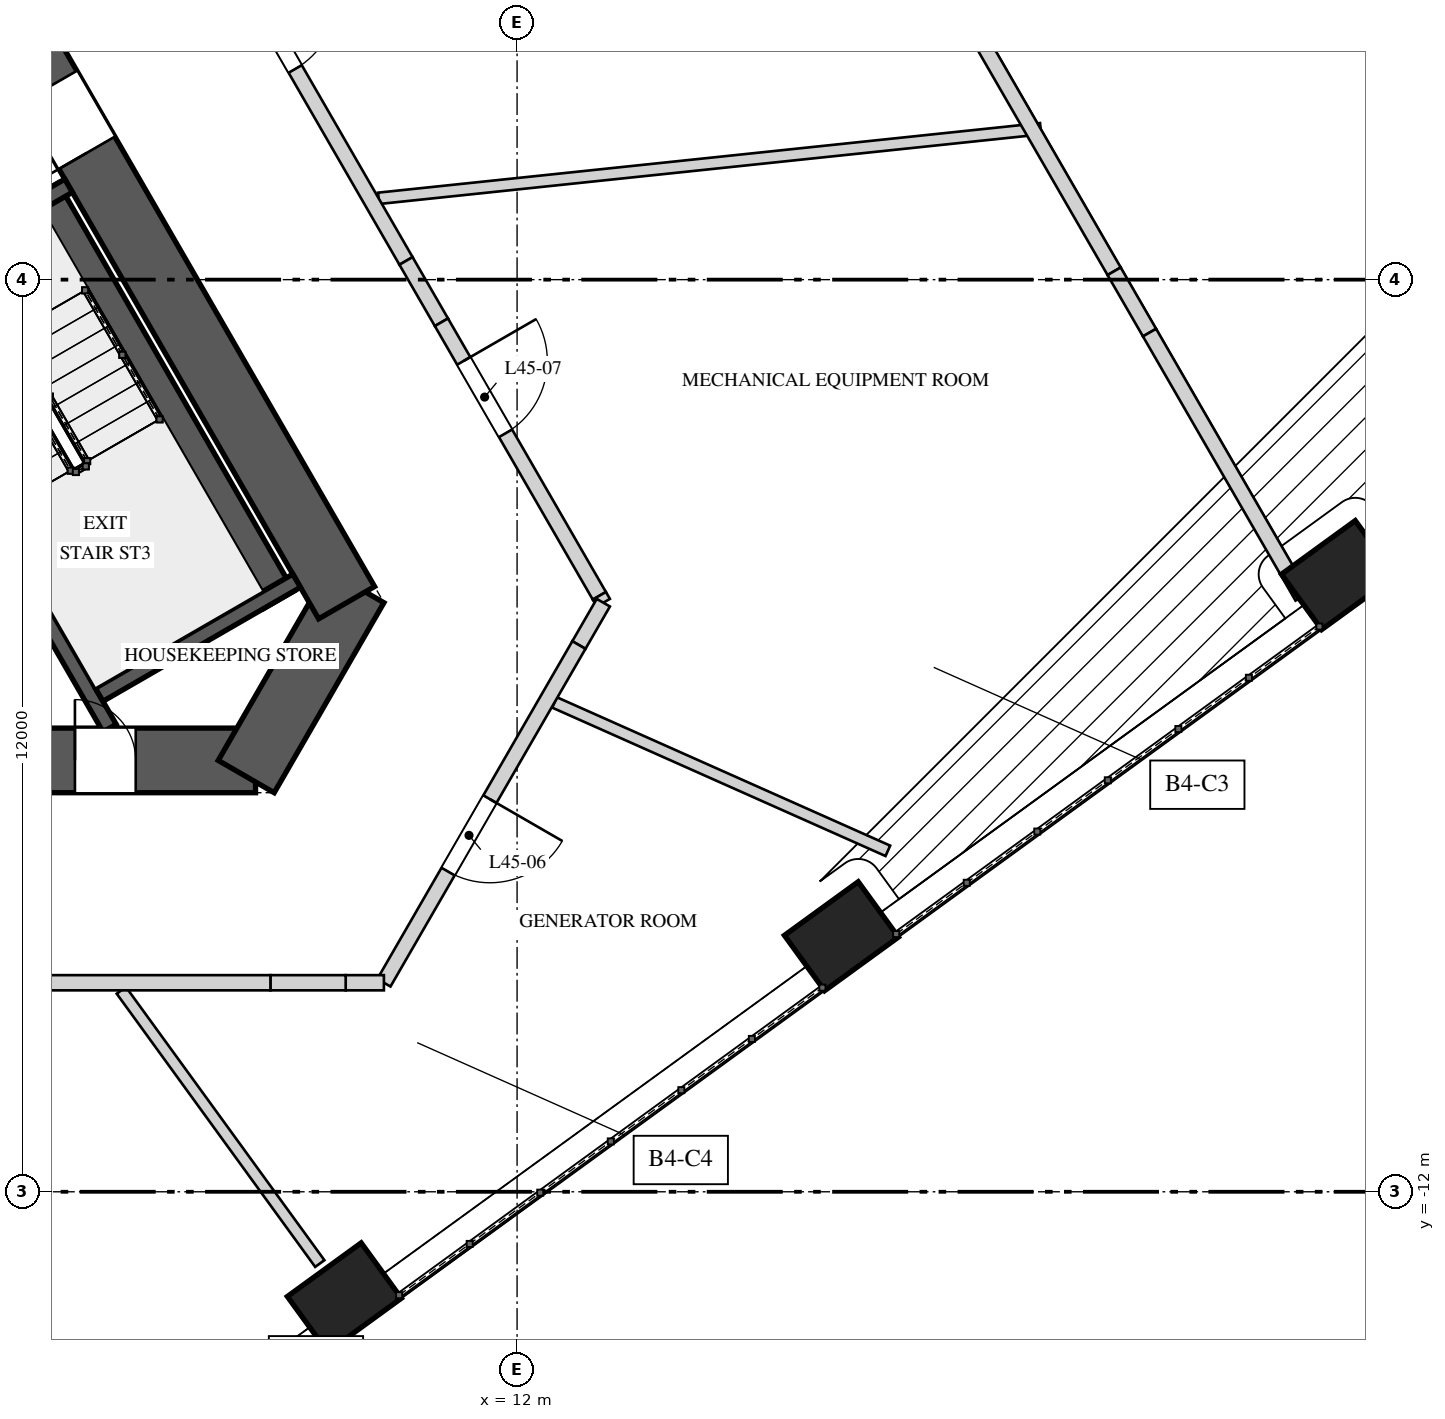
"""IFC4 building model, lengths in metres.
Left out: names, types, materials, properties, quantities, classifications, styles, units other than length and angle.
Written with IfcOpenShell. Run it as: python <this file> out.ifc"""

import sys

from ifc_helpers import new_model, si_unit, direction, frame, frame_2d, origin, origin_2d, place, context, subcontext, project, spatial, rectangle, extrude, element, fill, save


model = new_model("IFC4")
c1 = context("Model", 3, precision=1e-05, world=origin(), true_north=direction((0.0, 1.0)))
c2 = subcontext(c1, "Body", "Model", "MODEL_VIEW")
j1 = project(units=[si_unit("LENGTHUNIT", "METRE"), si_unit("PLANEANGLEUNIT", "RADIAN")], contexts=[c1])
p1 = place(None, origin())
s1 = spatial("IfcSite", under=j1, at=p1, CompositionType="ELEMENT")
p2 = place(p1, origin())
s2 = spatial("IfcBuilding", under=s1, at=p2, CompositionType="ELEMENT")
p3 = place(p2, frame((0.0, 0.0, 194.8)))
s3 = spatial("IfcBuildingStorey", under=s2, at=p3, CompositionType="ELEMENT", Elevation=194.8)
p4 = place(p3, frame((-8.559, -6.325, 0.0), z_axis=(0.0, 0.0, 1.0), x_axis=(1.0, 0.0, 0.0)))
e1 = element("IfcWall", 1, at=p4, inside=s3, PredefinedType="SHEAR", context=c2, shape_type="SweptSolid", body=[
    extrude(rectangle(XDim=17.118, YDim=0.85, at=frame_2d((8.559, 0.0))), origin(), (0.0, 0.0, 1.0), 5.2),
])
p5 = place(p4, frame((6.764, 0.0, 0.0)))
e2 = element("IfcOpeningElement", 2, at=p5, cuts=e1, PredefinedType="OPENING", context=c2, shape_type="SweptSolid", body=[
    extrude(rectangle(XDim=1.0, YDim=2.4, at=frame_2d((0.5, 1.2))), frame((0.0, 0.435, 0.0), z_axis=(0.0, -1.0, 0.0), x_axis=(1.0, 0.0, 0.0)), (0.0, 0.0, 1.0), 0.87),
])
p6 = place(p4, frame((14.742, 0.0, 0.0)))
e3 = element("IfcOpeningElement", 3, at=p6, cuts=e1, PredefinedType="OPENING", context=c2, shape_type="SweptSolid", body=[
    extrude(rectangle(XDim=0.8, YDim=2.1, at=frame_2d((0.4, 1.05))), frame((0.0, 0.435, 0.0), z_axis=(0.0, -1.0, 0.0), x_axis=(1.0, 0.0, 0.0)), (0.0, 0.0, 1.0), 0.87),
])
p7 = place(p3, frame((8.437, -6.538, 0.0), z_axis=(0.0, 0.0, 1.0), x_axis=(0.499995765644, 0.866027848477, 0.0)))
e4 = element("IfcWall", 4, at=p7, inside=s3, PredefinedType="SHEAR", context=c2, shape_type="SweptSolid", body=[
    extrude(rectangle(XDim=2.887, YDim=0.85, at=frame_2d((1.443, 0.0))), origin(), (0.0, 0.0, 1.0), 5.2),
])
p8 = place(p3, frame((9.757, -4.25, 0.0), z_axis=(0.0, 0.0, 1.0), x_axis=(-0.499995289315, 0.866028123483, 0.0)))
e5 = element("IfcWall", 5, at=p8, inside=s3, PredefinedType="SHEAR", context=c2, shape_type="SweptSolid", body=[
    extrude(rectangle(XDim=17.118, YDim=0.85, at=frame_2d((8.559, 0.0))), origin(), (0.0, 0.0, 1.0), 5.2),
])
p9 = place(p8, frame((6.834, 0.0, 0.0)))
e6 = element("IfcOpeningElement", 6, at=p9, cuts=e5, PredefinedType="OPENING", context=c2, shape_type="SweptSolid", body=[
    extrude(rectangle(XDim=1.0, YDim=2.4, at=frame_2d((0.5, 1.2))), frame((0.0, 0.435, 0.0), z_axis=(0.0, -1.0, 0.0), x_axis=(1.0, 0.0, 0.0)), (0.0, 0.0, 1.0), 0.87),
])
p10 = place(p8, frame((14.252, 0.0, 0.0)))
e7 = element("IfcOpeningElement", 7, at=p10, cuts=e5, PredefinedType="OPENING", context=c2, shape_type="SweptSolid", body=[
    extrude(rectangle(XDim=0.8, YDim=2.1, at=frame_2d((0.4, 1.05))), frame((0.0, 0.435, 0.0), z_axis=(0.0, -1.0, 0.0), x_axis=(1.0, 0.0, 0.0)), (0.0, 0.0, 1.0), 0.87),
])
for number, where, z_axis, x_axis in (
    (8, (9.728, -13.389, 0.0), (0.0, 0.0, 1.0), (0.809, 0.588, 0.0)),
    (9, (16.267, -8.638, 0.0), (0.0, 0.0, 1.0), (0.809, 0.588, 0.0)),
    (10, (22.806, -3.887, 0.0), (0.0, 0.0, 1.0), (0.809, 0.588, 0.0)),
):
    element("IfcColumn", number, at=place(p3, frame(where, z_axis=z_axis, x_axis=x_axis)), inside=s3, PredefinedType="COLUMN", context=c2, shape_type="SweptSolid", body=[
        extrude(rectangle(XDim=1.2, YDim=0.9, at=origin_2d()), origin(), (0.0, 0.0, 1.0), 2.835),
    ])
p11 = place(p3, frame((8.868, -4.21, 0.0), z_axis=(0.0, 0.0, 1.0), x_axis=(-0.500009909098, 0.866019682689, 0.0)))
e11 = element("IfcWall", 11, at=p11, inside=s3, PredefinedType="SOLIDWALL", context=c2, shape_type="SweptSolid", body=[
    extrude(rectangle(XDim=6.2, YDim=0.45, at=frame_2d((3.1, 0.0))), origin(), (0.0, 0.0, 1.0), 4.85),
])
p12 = place(p3, frame((6.64, -5.9, 0.0), z_axis=(0.0, 0.0, 1.0), x_axis=(-0.499999959354, 0.866025427251, 0.0)))
e12 = element("IfcWall", 12, at=p12, inside=s3, PredefinedType="SOLIDWALL", context=c2, shape_type="SweptSolid", body=[
    extrude(rectangle(XDim=6.549, YDim=0.2, at=frame_2d((3.275, 0.0))), origin(), (0.0, 0.0, 1.0), 4.85),
])
p13 = place(p3, frame((6.501, -5.461, 0.0), z_axis=(0.0, 0.0, 1.0), x_axis=(0.866031096941, 0.499990139034, 0.0)))
e13 = element("IfcWall", 13, at=p13, inside=s3, PredefinedType="SOLIDWALL", context=c2, shape_type="SweptSolid", body=[
    extrude(rectangle(XDim=3.0, YDim=0.2, at=frame_2d((1.5, 0.0))), origin(), (0.0, 0.0, 1.0), 4.85),
])
p14 = place(p3, frame((3.501, -0.265, 0.0), z_axis=(0.0, 0.0, 1.0), x_axis=(0.866031096941, 0.499990139034, 0.0)))
e14 = element("IfcWall", 14, at=p14, inside=s3, PredefinedType="SOLIDWALL", context=c2, shape_type="SweptSolid", body=[
    extrude(rectangle(XDim=3.0, YDim=0.2, at=frame_2d((1.5, 0.0))), origin(), (0.0, 0.0, 1.0), 4.85),
])
p15 = place(p14, frame((0.725, 0.0, 0.0)))
e15 = element("IfcOpeningElement", 15, at=p15, cuts=e14, PredefinedType="OPENING", context=c2, shape_type="SweptSolid", body=[
    extrude(rectangle(XDim=1.1, YDim=2.4, at=frame_2d((0.55, 1.2))), frame((0.0, 0.11, 0.0), z_axis=(0.0, -1.0, 0.0), x_axis=(1.0, 0.0, 0.0)), (0.0, 0.0, 1.0), 0.22),
])
p16 = place(p3, frame((6.793, -9.35, 0.0), z_axis=(0.0, 0.0, 1.0), x_axis=(0.587779529971, -0.809021151854, 0.0)))
e16 = element("IfcWall", 16, at=p16, inside=s3, PredefinedType="PARTITIONING", context=c2, shape_type="SweptSolid", body=[
    extrude(rectangle(XDim=4.443, YDim=0.15, at=frame_2d((2.221, 0.0))), origin(), (0.0, 0.0, 1.0), 4.85),
])
p17 = place(p3, frame((10.179, 1.07, 0.0), z_axis=(0.0, 0.0, 1.0), x_axis=(0.994523006427, 0.104517891713, 0.0)))
e17 = element("IfcWall", 17, at=p17, inside=s3, PredefinedType="PARTITIONING", context=c2, shape_type="SweptSolid", body=[
    extrude(rectangle(XDim=8.757, YDim=0.15, at=frame_2d((4.378, 0.0))), origin(), (0.0, 0.0, 1.0), 4.85),
])
p18 = place(p3, frame((12.493, -5.562, 0.0), z_axis=(0.0, 0.0, 1.0), x_axis=(0.913530294257, -0.40677069889, 0.0)))
e18 = element("IfcWall", 18, at=p18, inside=s3, PredefinedType="PARTITIONING", context=c2, shape_type="SweptSolid", body=[
    extrude(rectangle(XDim=4.8, YDim=0.15, at=frame_2d((2.4, 0.0))), origin(), (0.0, 0.0, 1.0), 4.85),
])
p19 = place(p3, frame((8.143, 4.396, 0.0), z_axis=(0.0, 0.0, 1.0), x_axis=(0.499997407846, -0.86602690036, 0.0)))
e19 = element("IfcWall", 19, at=p19, inside=s3, PredefinedType="SOLIDWALL", context=c2, shape_type="SweptSolid", body=[
    extrude(rectangle(XDim=4.791, YDim=0.2, at=frame_2d((2.396, 0.0))), origin(), (0.0, 0.0, 1.0), 4.85),
])
p20 = place(p19, frame((0.775, 0.0, 0.0)))
e20 = element("IfcOpeningElement", 20, at=p20, cuts=e19, PredefinedType="OPENING", context=c2, shape_type="SweptSolid", body=[
    extrude(rectangle(XDim=1.1, YDim=2.2, at=frame_2d((0.55, 1.1))), frame((0.0, 0.11, 0.0), z_axis=(0.0, -1.0, 0.0), x_axis=(1.0, 0.0, 0.0)), (0.0, 0.0, 1.0), 0.22),
])
p21 = place(p3, frame((10.539, 0.246, 0.0), z_axis=(0.0, 0.0, 1.0), x_axis=(0.499971966783, -0.866041588165, 0.0)))
e21 = element("IfcWall", 21, at=p21, inside=s3, PredefinedType="SOLIDWALL", context=c2, shape_type="SweptSolid", body=[
    extrude(rectangle(XDim=0.932, YDim=0.2, at=frame_2d((0.466, 0.0))), origin(), (0.0, 0.0, 1.0), 3.95),
])
p22 = place(p3, frame((11.005, -0.561, 0.0), z_axis=(0.0, 0.0, 1.0), x_axis=(0.499993700073, -0.866029041019, 0.0)))
e22 = element("IfcWall", 22, at=p22, inside=s3, PredefinedType="SOLIDWALL", context=c2, shape_type="SweptSolid", body=[
    extrude(rectangle(XDim=4.155, YDim=0.2, at=frame_2d((2.078, 0.0))), origin(), (0.0, 0.0, 1.0), 4.85),
])
p23 = place(p22, frame((0.587, 0.0, 0.0)))
e23 = element("IfcOpeningElement", 23, at=p23, cuts=e22, PredefinedType="OPENING", context=c2, shape_type="SweptSolid", body=[
    extrude(rectangle(XDim=1.1, YDim=2.2, at=frame_2d((0.55, 1.1))), frame((0.0, 0.11, 0.0), z_axis=(0.0, -1.0, 0.0), x_axis=(1.0, 0.0, 0.0)), (0.0, 0.0, 1.0), 0.22),
])
p24 = place(p3, frame((13.082, -4.159, 0.0), z_axis=(0.0, 0.0, 1.0), x_axis=(0.500393920955, -0.865797853931, 0.0)))
e24 = element("IfcWall", 24, at=p24, inside=s3, PredefinedType="SOLIDWALL", context=c2, shape_type="SweptSolid", body=[
    extrude(rectangle(XDim=0.105, YDim=0.2, at=frame_2d((0.052, 0.0))), origin(), (0.0, 0.0, 1.0), 4.15),
])
p25 = place(p3, frame((13.135, -4.25, 0.0), z_axis=(0.0, 0.0, 1.0), x_axis=(-0.500018234033, -0.866014876105, 0.0)))
e25 = element("IfcWall", 25, at=p25, inside=s3, PredefinedType="SOLIDWALL", context=c2, shape_type="SweptSolid", body=[
    extrude(rectangle(XDim=0.643, YDim=0.2, at=frame_2d((0.322, 0.0))), origin(), (0.0, 0.0, 1.0), 4.15),
])
p26 = place(p3, frame((12.813, -4.807, 0.0), z_axis=(0.0, 0.0, 1.0), x_axis=(-0.499992949462, -0.866029474376, 0.0)))
e26 = element("IfcWall", 26, at=p26, inside=s3, PredefinedType="SOLIDWALL", context=c2, shape_type="SweptSolid", body=[
    extrude(rectangle(XDim=5.13, YDim=0.2, at=frame_2d((2.565, 0.0))), origin(), (0.0, 0.0, 1.0), 4.85),
])
p27 = place(p26, frame((2.342, 0.0, 0.0)))
e27 = element("IfcOpeningElement", 27, at=p27, cuts=e26, PredefinedType="OPENING", context=c2, shape_type="SweptSolid", body=[
    extrude(rectangle(XDim=1.1, YDim=2.2, at=frame_2d((0.55, 1.1))), frame((0.0, 0.11, 0.0), z_axis=(0.0, -1.0, 0.0), x_axis=(1.0, 0.0, 0.0)), (0.0, 0.0, 1.0), 0.22),
])
p28 = place(p3, frame((10.248, -9.25, 0.0), z_axis=(0.0, 0.0, 1.0), x_axis=(-1.0, 0.0, 0.0)))
e28 = element("IfcWall", 28, at=p28, inside=s3, PredefinedType="SOLIDWALL", context=c2, shape_type="SweptSolid", body=[
    extrude(rectangle(XDim=0.503, YDim=0.2, at=frame_2d((0.251, 0.0))), origin(), (0.0, 0.0, 1.0), 4.85),
])
p29 = place(p3, frame((9.745, -9.25, 0.0), z_axis=(0.0, 0.0, 1.0), x_axis=(-1.0, 0.0, 0.0)))
e29 = element("IfcWall", 29, at=p29, inside=s3, PredefinedType="SOLIDWALL", context=c2, shape_type="SweptSolid", body=[
    extrude(rectangle(XDim=0.99, YDim=0.2, at=frame_2d((0.495, 0.0))), origin(), (0.0, 0.0, 1.0), 4.15),
])
p30 = place(p3, frame((8.755, -9.25, 0.0), z_axis=(0.0, 0.0, 1.0), x_axis=(-1.0, 0.0, 0.0)))
e30 = element("IfcWall", 30, at=p30, inside=s3, PredefinedType="SOLIDWALL", context=c2, shape_type="SweptSolid", body=[
    extrude(rectangle(XDim=5.182, YDim=0.2, at=frame_2d((2.591, 0.0))), origin(), (0.0, 0.0, 1.0), 4.85),
])
p31 = place(p3, frame((15.013, 8.497, 0.0), z_axis=(0.0, 0.0, 1.0), x_axis=(0.499981435953, -0.866036121476, 0.0)))
e31 = element("IfcWall", 31, at=p31, inside=s3, PredefinedType="SOLIDWALL", context=c2, shape_type="SweptSolid", body=[
    extrude(rectangle(XDim=9.683, YDim=0.2, at=frame_2d((4.842, 0.0))), origin(), (0.0, 0.0, 1.0), 4.85),
])
p32 = place(p3, frame((19.855, 0.11, 0.0), z_axis=(0.0, 0.0, 1.0), x_axis=(0.500168465368, -0.865928118409, 0.0)))
e32 = element("IfcWall", 32, at=p32, inside=s3, PredefinedType="SOLIDWALL", context=c2, shape_type="SweptSolid", body=[
    extrude(rectangle(XDim=0.932, YDim=0.2, at=frame_2d((0.466, 0.0))), origin(), (0.0, 0.0, 1.0), 3.95),
])
p33 = place(p3, frame((20.321, -0.697, 0.0), z_axis=(0.0, 0.0, 1.0), x_axis=(0.499978660597, -0.866037723744, 0.0)))
e33 = element("IfcWall", 33, at=p33, inside=s3, PredefinedType="SOLIDWALL", context=c2, shape_type="SweptSolid", body=[
    extrude(rectangle(XDim=4.014, YDim=0.2, at=frame_2d((2.007, 0.0))), origin(), (0.0, 0.0, 1.0), 4.85),
])
p34 = place(p9, origin())
e34 = element("IfcDoor", 34, at=p34, inside=s3, OperationType="SINGLE_SWING_RIGHT", PredefinedType="DOOR", context=c2, shape_type="SweptSolid", body=[
    extrude(rectangle(XDim=1.0, YDim=2.4, at=frame_2d((0.5, 1.2))), frame((0.0, 0.025, 0.0), z_axis=(0.0, -1.0, 0.0), x_axis=(1.0, 0.0, 0.0)), (0.0, 0.0, 1.0), 0.05),
])
fill(e6, e34)
p35 = place(p6, origin())
e35 = element("IfcDoor", 35, at=p35, inside=s3, OperationType="SINGLE_SWING_LEFT", PredefinedType="DOOR", context=c2, shape_type="SweptSolid", body=[
    extrude(rectangle(XDim=0.8, YDim=2.1, at=frame_2d((0.4, 1.05))), frame((0.0, 0.025, 0.0), z_axis=(0.0, -1.0, 0.0), x_axis=(1.0, 0.0, 0.0)), (0.0, 0.0, 1.0), 0.05),
])
fill(e3, e35)
p36 = place(p27, origin())
e36 = element("IfcDoor", 36, at=p36, inside=s3, OperationType="SINGLE_SWING_RIGHT", PredefinedType="DOOR", context=c2, shape_type="SweptSolid", body=[
    extrude(rectangle(XDim=1.1, YDim=2.2, at=frame_2d((0.55, 1.1))), frame((0.0, 0.025, 0.0), z_axis=(0.0, -1.0, 0.0), x_axis=(1.0, 0.0, 0.0)), (0.0, 0.0, 1.0), 0.05),
])
fill(e27, e36)
p37 = place(p23, origin())
e37 = element("IfcDoor", 37, at=p37, inside=s3, OperationType="SINGLE_SWING_LEFT", PredefinedType="DOOR", context=c2, shape_type="SweptSolid", body=[
    extrude(rectangle(XDim=1.1, YDim=2.2, at=frame_2d((0.55, 1.1))), frame((0.0, 0.025, 0.0), z_axis=(0.0, -1.0, 0.0), x_axis=(1.0, 0.0, 0.0)), (0.0, 0.0, 1.0), 0.05),
])
fill(e23, e37)
p38 = place(p20, origin())
e38 = element("IfcDoor", 38, at=p38, inside=s3, OperationType="SINGLE_SWING_RIGHT", PredefinedType="DOOR", context=c2, shape_type="SweptSolid", body=[
    extrude(rectangle(XDim=1.1, YDim=2.2, at=frame_2d((0.55, 1.1))), frame((0.0, 0.025, 0.0), z_axis=(0.0, -1.0, 0.0), x_axis=(1.0, 0.0, 0.0)), (0.0, 0.0, 1.0), 0.05),
])
fill(e20, e38)
save(model, sys.argv[1])
